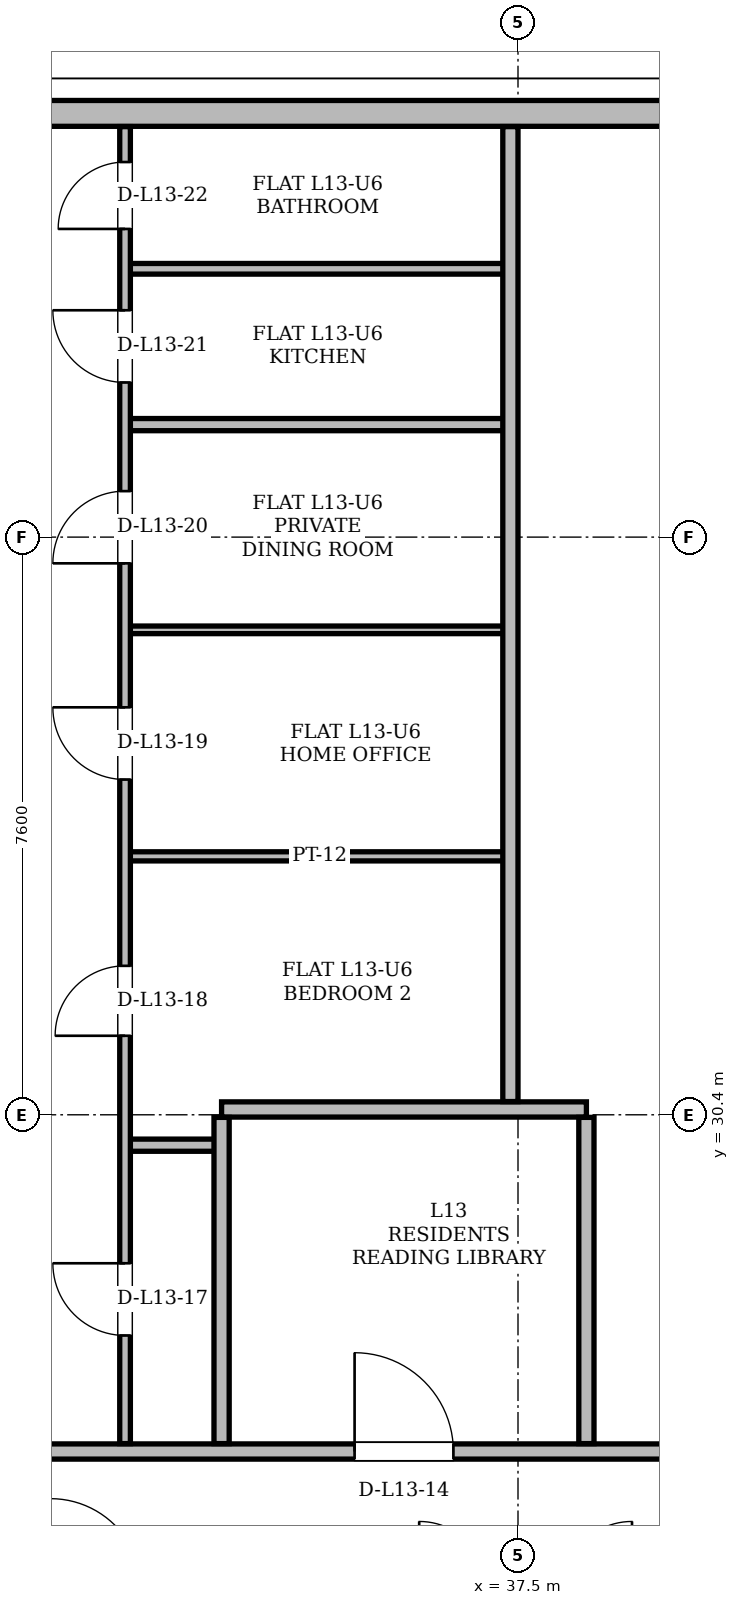
"""IFC4 building model, lengths in metres.
Left out: names, types, materials, properties, quantities, classifications, styles, units other than length and angle.
Written with IfcOpenShell. Run it as: python <this file> out.ifc"""

import sys

from ifc_helpers import new_model, si_unit, direction, frame, frame_2d, origin, place, context, subcontext, project, spatial, rectangle, extrude, element, fill, save


model = new_model("IFC4")
c1 = context("Model", 3, precision=1e-05, world=origin(), true_north=direction((0.0, 1.0)))
c2 = subcontext(c1, "Body", "Model", "MODEL_VIEW")
j1 = project(units=[si_unit("LENGTHUNIT", "METRE"), si_unit("PLANEANGLEUNIT", "RADIAN")], contexts=[c1])
p1 = place(None, origin())
s1 = spatial("IfcSite", under=j1, at=p1, CompositionType="ELEMENT")
p2 = place(p1, origin())
s2 = spatial("IfcBuilding", under=s1, at=p2, CompositionType="ELEMENT")
p3 = place(p2, frame((0.0, 0.0, 52.5)))
s3 = spatial("IfcBuildingStorey", under=s2, at=p3, CompositionType="ELEMENT", Elevation=52.5)
p4 = place(p3, frame((44.757, 43.574, 0.0), z_axis=(0.0, 0.0, 1.0), x_axis=(-1.0, 0.0, 0.0)))
e1 = element("IfcWall", 1, at=p4, inside=s3, PredefinedType="SOLIDWALL", context=c2, shape_type="SweptSolid", body=[
    extrude(rectangle(XDim=14.515, YDim=0.34, at=frame_2d((7.257, 0.0))), origin(), (0.0, 0.0, 1.0), 2.494),
])
p5 = place(p3, frame((27.55, 25.97, 0.0), z_axis=(0.0, 0.0, 1.0), x_axis=(1.0, 0.0, 0.0)))
e2 = element("IfcWall", 2, at=p5, inside=s3, PredefinedType="PARTITIONING", context=c2, shape_type="SweptSolid", body=[
    extrude(rectangle(XDim=19.9, YDim=0.2, at=frame_2d((9.95, 0.0))), origin(), (0.0, 0.0, 1.0), 2.738),
])
p6 = place(p5, frame((2.06, 0.0, 0.0)))
e3 = element("IfcOpeningElement", 3, at=p6, cuts=e2, PredefinedType="OPENING", context=c2, shape_type="SweptSolid", body=[
    extrude(rectangle(XDim=1.0, YDim=2.18, at=frame_2d((0.5, 1.09))), frame((0.0, 0.1, 0.0), z_axis=(0.0, -1.0, 0.0), x_axis=(1.0, 0.0, 0.0)), (0.0, 0.0, 1.0), 0.2),
])
p7 = place(p5, frame((7.8, 0.0, 0.0)))
e4 = element("IfcOpeningElement", 4, at=p7, cuts=e2, PredefinedType="OPENING", context=c2, shape_type="SweptSolid", body=[
    extrude(rectangle(XDim=1.3, YDim=2.2, at=frame_2d((0.65, 1.1))), frame((0.0, 0.1, 0.0), z_axis=(0.0, -1.0, 0.0), x_axis=(1.0, 0.0, 0.0)), (0.0, 0.0, 1.0), 0.2),
])
p8 = place(p3, frame((32.332, 30.0, 0.0), z_axis=(0.0, 0.0, 1.0), x_axis=(1.0, 0.0, 0.0)))
e5 = element("IfcWall", 5, at=p8, inside=s3, PredefinedType="PARTITIONING", context=c2, shape_type="SweptSolid", body=[
    extrude(rectangle(XDim=1.318, YDim=0.16, at=frame_2d((0.659, 0.0))), origin(), (0.0, 0.0, 1.0), 3.36),
])
p9 = place(p3, frame((33.6, 30.47, 0.0), z_axis=(0.0, 0.0, 1.0), x_axis=(1.0, 0.0, 0.0)))
e6 = element("IfcWall", 6, at=p9, inside=s3, PredefinedType="PARTITIONING", context=c2, shape_type="SweptSolid", body=[
    extrude(rectangle(XDim=4.8, YDim=0.2, at=frame_2d((2.4, 0.0))), origin(), (0.0, 0.0, 1.0), 3.36),
])
p10 = place(p3, frame((32.332, 33.8, 0.0), z_axis=(0.0, 0.0, 1.0), x_axis=(1.0, 0.0, 0.0)))
e7 = element("IfcWall", 7, at=p10, inside=s3, PredefinedType="PARTITIONING", context=c2, shape_type="SweptSolid", body=[
    extrude(rectangle(XDim=5.118, YDim=0.12, at=frame_2d((2.559, 0.0))), origin(), (0.0, 0.0, 1.0), 3.36),
])
p11 = place(p3, frame((32.332, 36.78, 0.0), z_axis=(0.0, 0.0, 1.0), x_axis=(1.0, 0.0, 0.0)))
e8 = element("IfcWall", 8, at=p11, inside=s3, PredefinedType="PARTITIONING", context=c2, shape_type="SweptSolid", body=[
    extrude(rectangle(XDim=5.118, YDim=0.1, at=frame_2d((2.559, 0.0))), origin(), (0.0, 0.0, 1.0), 3.36),
])
p12 = place(p3, frame((32.332, 39.48, 0.0), z_axis=(0.0, 0.0, 1.0), x_axis=(1.0, 0.0, 0.0)))
e9 = element("IfcWall", 9, at=p12, inside=s3, PredefinedType="PARTITIONING", context=c2, shape_type="SweptSolid", body=[
    extrude(rectangle(XDim=5.118, YDim=0.16, at=frame_2d((2.559, 0.0))), origin(), (0.0, 0.0, 1.0), 3.36),
])
p13 = place(p3, frame((32.332, 41.53, 0.0), z_axis=(0.0, 0.0, 1.0), x_axis=(1.0, 0.0, 0.0)))
e10 = element("IfcWall", 10, at=p13, inside=s3, PredefinedType="PARTITIONING", context=c2, shape_type="SweptSolid", body=[
    extrude(rectangle(XDim=5.118, YDim=0.14, at=frame_2d((2.559, 0.0))), origin(), (0.0, 0.0, 1.0), 3.36),
])
p14 = place(p3, frame((32.33, 26.074, 0.0), z_axis=(0.0, 0.0, 1.0), x_axis=(0.0, 1.0, 0.0)))
e11 = element("IfcWall", 11, at=p14, inside=s3, PredefinedType="PARTITIONING", context=c2, shape_type="SweptSolid", body=[
    extrude(rectangle(XDim=17.326, YDim=0.14, at=frame_2d((8.663, 0.0))), origin(), (0.0, 0.0, 1.0), 3.36),
])
p15 = place(p14, frame((1.423, 0.0, 0.0)))
e12 = element("IfcOpeningElement", 12, at=p15, cuts=e11, PredefinedType="OPENING", context=c2, shape_type="SweptSolid", body=[
    extrude(rectangle(XDim=0.95, YDim=2.1, at=frame_2d((0.475, 1.05))), frame((0.0, 0.07, 0.0), z_axis=(0.0, -1.0, 0.0), x_axis=(1.0, 0.0, 0.0)), (0.0, 0.0, 1.0), 0.14),
])
p16 = place(p14, frame((5.365, 0.0, 0.0)))
e13 = element("IfcOpeningElement", 13, at=p16, cuts=e11, PredefinedType="OPENING", context=c2, shape_type="SweptSolid", body=[
    extrude(rectangle(XDim=0.92, YDim=2.12, at=frame_2d((0.46, 1.06))), frame((0.0, 0.07, 0.0), z_axis=(0.0, -1.0, 0.0), x_axis=(1.0, 0.0, 0.0)), (0.0, 0.0, 1.0), 0.14),
])
p17 = place(p14, frame((8.737, 0.0, 0.0)))
e14 = element("IfcOpeningElement", 14, at=p17, cuts=e11, PredefinedType="OPENING", context=c2, shape_type="SweptSolid", body=[
    extrude(rectangle(XDim=0.95, YDim=2.1, at=frame_2d((0.475, 1.05))), frame((0.0, 0.07, 0.0), z_axis=(0.0, -1.0, 0.0), x_axis=(1.0, 0.0, 0.0)), (0.0, 0.0, 1.0), 0.14),
])
p18 = place(p14, frame((11.581, 0.0, 0.0)))
e15 = element("IfcOpeningElement", 15, at=p18, cuts=e11, PredefinedType="OPENING", context=c2, shape_type="SweptSolid", body=[
    extrude(rectangle(XDim=0.95, YDim=2.1, at=frame_2d((0.475, 1.05))), frame((0.0, 0.07, 0.0), z_axis=(0.0, -1.0, 0.0), x_axis=(1.0, 0.0, 0.0)), (0.0, 0.0, 1.0), 0.14),
])
p19 = place(p14, frame((13.96, 0.0, 0.0)))
e16 = element("IfcOpeningElement", 16, at=p19, cuts=e11, PredefinedType="OPENING", context=c2, shape_type="SweptSolid", body=[
    extrude(rectangle(XDim=0.95, YDim=2.1, at=frame_2d((0.475, 1.05))), frame((0.0, 0.07, 0.0), z_axis=(0.0, -1.0, 0.0), x_axis=(1.0, 0.0, 0.0)), (0.0, 0.0, 1.0), 0.14),
])
p20 = place(p14, frame((15.98, 0.0, 0.0)))
e17 = element("IfcOpeningElement", 17, at=p20, cuts=e11, PredefinedType="OPENING", context=c2, shape_type="SweptSolid", body=[
    extrude(rectangle(XDim=0.88, YDim=2.08, at=frame_2d((0.44, 1.04))), frame((0.0, 0.07, 0.0), z_axis=(0.0, -1.0, 0.0), x_axis=(1.0, 0.0, 0.0)), (0.0, 0.0, 1.0), 0.14),
])
p21 = place(p3, frame((33.6, 26.074, 0.0), z_axis=(0.0, 0.0, 1.0), x_axis=(0.0, 1.0, 0.0)))
e18 = element("IfcWall", 18, at=p21, inside=s3, PredefinedType="PARTITIONING", context=c2, shape_type="SweptSolid", body=[
    extrude(rectangle(XDim=4.292, YDim=0.2, at=frame_2d((2.146, 0.0))), origin(), (0.0, 0.0, 1.0), 3.36),
])
p22 = place(p3, frame((37.4, 30.574, 0.0), z_axis=(0.0, 0.0, 1.0), x_axis=(0.0, 1.0, 0.0)))
e19 = element("IfcWall", 19, at=p22, inside=s3, PredefinedType="PARTITIONING", context=c2, shape_type="SweptSolid", body=[
    extrude(rectangle(XDim=12.826, YDim=0.2, at=frame_2d((6.413, 0.0))), origin(), (0.0, 0.0, 1.0), 3.36),
])
p23 = place(p3, frame((38.4, 26.074, 0.0), z_axis=(0.0, 0.0, 1.0), x_axis=(0.0, 1.0, 0.0)))
e20 = element("IfcWall", 20, at=p23, inside=s3, PredefinedType="PARTITIONING", context=c2, shape_type="SweptSolid", body=[
    extrude(rectangle(XDim=4.292, YDim=0.2, at=frame_2d((2.146, 0.0))), origin(), (0.0, 0.0, 1.0), 3.36),
])
p24 = place(p7, origin())
e21 = element("IfcDoor", 21, at=p24, inside=s3, OperationType="SINGLE_SWING_LEFT", PredefinedType="DOOR", context=c2, shape_type="SweptSolid", body=[
    extrude(rectangle(XDim=1.3, YDim=2.2, at=frame_2d((0.65, 1.1))), frame((0.0, 0.025, 0.0), z_axis=(0.0, -1.0, 0.0), x_axis=(1.0, 0.0, 0.0)), (0.0, 0.0, 1.0), 0.05),
])
fill(e4, e21)
p25 = place(p15, origin())
e22 = element("IfcDoor", 22, at=p25, inside=s3, OperationType="SINGLE_SWING_RIGHT", PredefinedType="DOOR", context=c2, shape_type="SweptSolid", body=[
    extrude(rectangle(XDim=0.95, YDim=2.1, at=frame_2d((0.475, 1.05))), frame((0.0, 0.025, 0.0), z_axis=(0.0, -1.0, 0.0), x_axis=(1.0, 0.0, 0.0)), (0.0, 0.0, 1.0), 0.05),
])
fill(e12, e22)
p26 = place(p16, origin())
e23 = element("IfcDoor", 23, at=p26, inside=s3, OperationType="SINGLE_SWING_LEFT", PredefinedType="DOOR", context=c2, shape_type="SweptSolid", body=[
    extrude(rectangle(XDim=0.92, YDim=2.12, at=frame_2d((0.46, 1.06))), frame((0.0, 0.025, 0.0), z_axis=(0.0, -1.0, 0.0), x_axis=(1.0, 0.0, 0.0)), (0.0, 0.0, 1.0), 0.05),
])
fill(e13, e23)
p27 = place(p17, origin())
e24 = element("IfcDoor", 24, at=p27, inside=s3, OperationType="SINGLE_SWING_RIGHT", PredefinedType="DOOR", context=c2, shape_type="SweptSolid", body=[
    extrude(rectangle(XDim=0.95, YDim=2.1, at=frame_2d((0.475, 1.05))), frame((0.0, 0.025, 0.0), z_axis=(0.0, -1.0, 0.0), x_axis=(1.0, 0.0, 0.0)), (0.0, 0.0, 1.0), 0.05),
])
fill(e14, e24)
p28 = place(p18, origin())
e25 = element("IfcDoor", 25, at=p28, inside=s3, OperationType="SINGLE_SWING_LEFT", PredefinedType="DOOR", context=c2, shape_type="SweptSolid", body=[
    extrude(rectangle(XDim=0.95, YDim=2.1, at=frame_2d((0.475, 1.05))), frame((0.0, 0.025, 0.0), z_axis=(0.0, -1.0, 0.0), x_axis=(1.0, 0.0, 0.0)), (0.0, 0.0, 1.0), 0.05),
])
fill(e15, e25)
p29 = place(p19, origin())
e26 = element("IfcDoor", 26, at=p29, inside=s3, OperationType="SINGLE_SWING_RIGHT", PredefinedType="DOOR", context=c2, shape_type="SweptSolid", body=[
    extrude(rectangle(XDim=0.95, YDim=2.1, at=frame_2d((0.475, 1.05))), frame((0.0, 0.025, 0.0), z_axis=(0.0, -1.0, 0.0), x_axis=(1.0, 0.0, 0.0)), (0.0, 0.0, 1.0), 0.05),
])
fill(e16, e26)
p30 = place(p20, origin())
e27 = element("IfcDoor", 27, at=p30, inside=s3, OperationType="SINGLE_SWING_LEFT", PredefinedType="DOOR", context=c2, shape_type="SweptSolid", body=[
    extrude(rectangle(XDim=0.88, YDim=2.08, at=frame_2d((0.44, 1.04))), frame((0.0, 0.025, 0.0), z_axis=(0.0, -1.0, 0.0), x_axis=(1.0, 0.0, 0.0)), (0.0, 0.0, 1.0), 0.05),
])
fill(e17, e27)
save(model, sys.argv[1])
